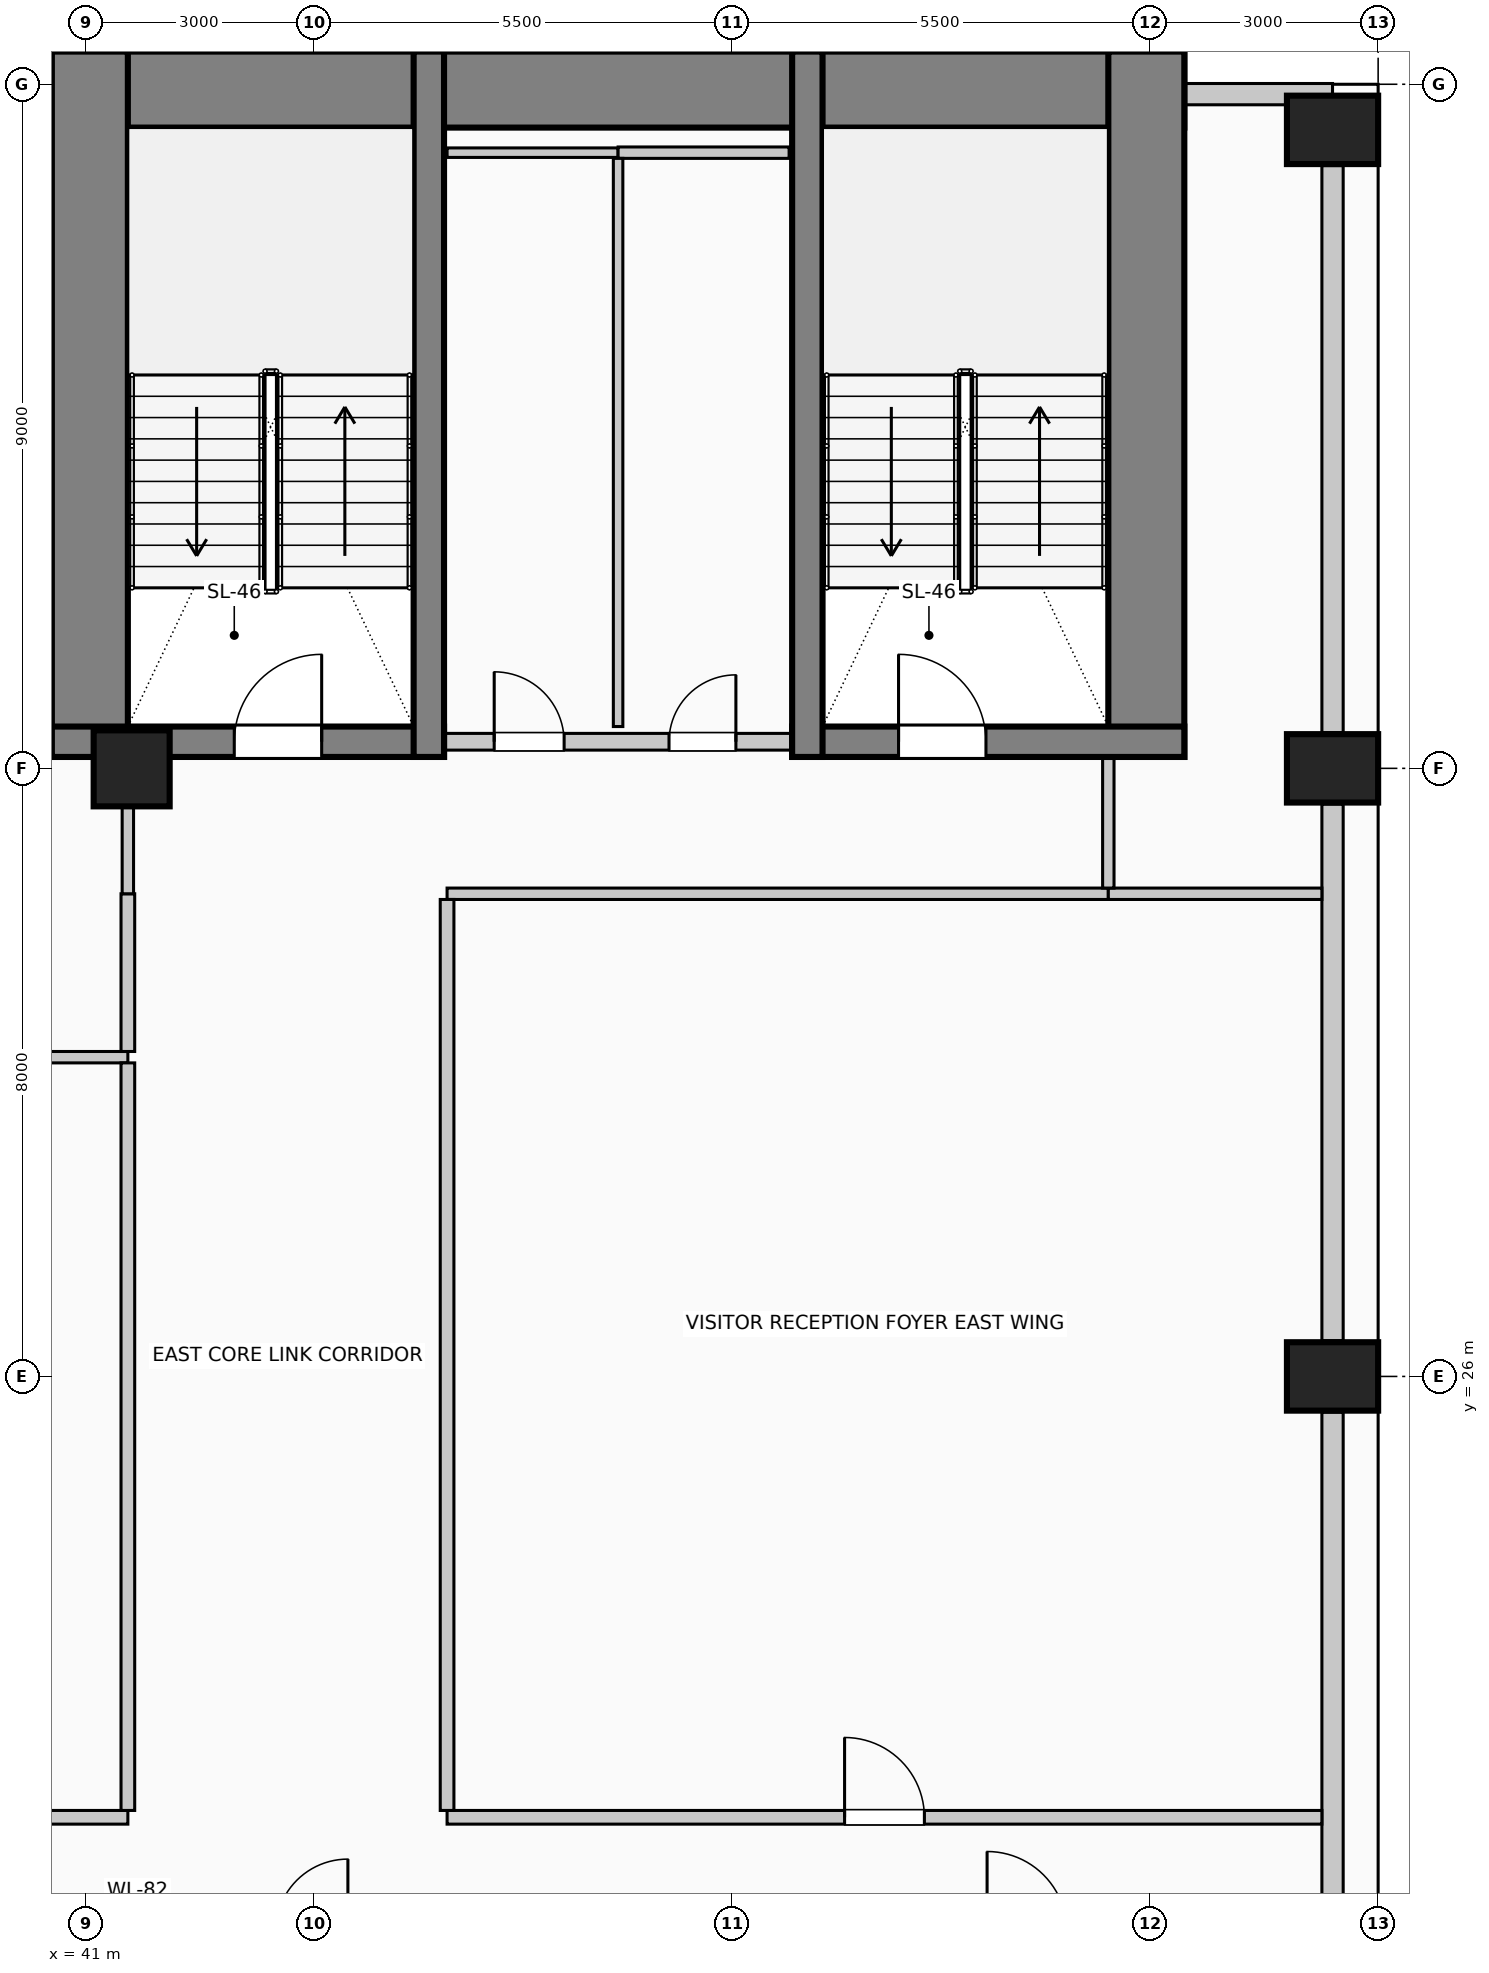
"""IFC4 building model, lengths in metres.
Left out: names, types, materials, properties, quantities, classifications, styles, units other than length and angle.
Written with IfcOpenShell. Run it as: python <this file> out.ifc"""

import sys

from ifc_helpers import new_model, si_unit, direction, frame, frame_2d, origin, origin_2d, place, context, subcontext, project, spatial, rectangle, circle, extrude, element, fill, save


model = new_model("IFC4")
c1 = context("Model", 3, precision=1e-05, world=origin(), true_north=direction((0.0, 1.0)))
c2 = subcontext(c1, "Body", "Model", "MODEL_VIEW")
j1 = project(units=[si_unit("LENGTHUNIT", "METRE"), si_unit("PLANEANGLEUNIT", "RADIAN")], contexts=[c1])
p1 = place(None, origin())
s1 = spatial("IfcSite", under=j1, at=p1, CompositionType="ELEMENT")
p2 = place(p1, origin())
s2 = spatial("IfcBuilding", under=s1, at=p2, CompositionType="ELEMENT")
p3 = place(p2, frame((0.0, 0.0, 66.6)))
s3 = spatial("IfcBuildingStorey", under=s2, at=p3, CompositionType="ELEMENT", Elevation=66.6)
p4 = place(p3, frame((40.55, 42.93, 0.0), z_axis=(0.0, 0.0, 1.0), x_axis=(1.0, 0.0, 0.0)))
e1 = element("IfcWall", 1, at=p4, inside=s3, PredefinedType="SHEAR", context=c2, shape_type="SweptSolid", body=[
    extrude(rectangle(XDim=14.9, YDim=1.0, at=frame_2d((7.45, 0.0))), origin(), (0.0, 0.0, 1.0), 4.0),
])
for number, where, z_axis, x_axis in (
    (2, (41.05, 34.15, 0.0), (0.0, 0.0, 1.0), (0.0, 1.0, 0.0)),
    (3, (54.95, 34.15, 0.0), (0.0, 0.0, 1.0), (0.0, 1.0, 0.0)),
):
    element("IfcWall", number, at=place(p3, frame(where, z_axis=z_axis, x_axis=x_axis)), inside=s3, PredefinedType="SHEAR", context=c2, shape_type="SweptSolid", body=[
        extrude(rectangle(XDim=9.28, YDim=1.0, at=frame_2d((4.64, 0.0))), origin(), (0.0, 0.0, 1.0), 4.0),
    ])
p5 = place(p3, frame((40.55, 34.35, 0.0), z_axis=(0.0, 0.0, 1.0), x_axis=(1.0, 0.0, 0.0)))
e4 = element("IfcWall", 4, at=p5, inside=s3, PredefinedType="SHEAR", context=c2, shape_type="SweptSolid", body=[
    extrude(rectangle(XDim=5.16, YDim=0.4, at=frame_2d((2.58, 0.0))), origin(), (0.0, 0.0, 1.0), 4.0),
])
p6 = place(p5, frame((2.4, 0.0, 0.0)))
e5 = element("IfcOpeningElement", 5, at=p6, cuts=e4, PredefinedType="OPENING", context=c2, shape_type="SweptSolid", body=[
    extrude(rectangle(XDim=1.15, YDim=2.2, at=frame_2d((0.575, 1.1))), frame((0.0, 0.21, 0.0), z_axis=(0.0, -1.0, 0.0), x_axis=(1.0, 0.0, 0.0)), (0.0, 0.0, 1.0), 0.42),
])
p7 = place(p3, frame((45.51, 34.15, 0.0), z_axis=(0.0, 0.0, 1.0), x_axis=(0.0, 1.0, 0.0)))
e6 = element("IfcWall", 6, at=p7, inside=s3, PredefinedType="SHEAR", context=c2, shape_type="SweptSolid", body=[
    extrude(rectangle(XDim=9.28, YDim=0.4, at=frame_2d((4.64, 0.0))), origin(), (0.0, 0.0, 1.0), 4.0),
])
p8 = place(p3, frame((50.29, 34.35, 0.0), z_axis=(0.0, 0.0, 1.0), x_axis=(1.0, 0.0, 0.0)))
e7 = element("IfcWall", 7, at=p8, inside=s3, PredefinedType="SHEAR", context=c2, shape_type="SweptSolid", body=[
    extrude(rectangle(XDim=5.16, YDim=0.4, at=frame_2d((2.58, 0.0))), origin(), (0.0, 0.0, 1.0), 4.0),
])
p9 = place(p8, frame((1.4, 0.0, 0.0)))
e8 = element("IfcOpeningElement", 8, at=p9, cuts=e7, PredefinedType="OPENING", context=c2, shape_type="SweptSolid", body=[
    extrude(rectangle(XDim=1.15, YDim=2.2, at=frame_2d((0.575, 1.1))), frame((0.0, 0.21, 0.0), z_axis=(0.0, -1.0, 0.0), x_axis=(1.0, 0.0, 0.0)), (0.0, 0.0, 1.0), 0.42),
])
p10 = place(p3, frame((50.49, 34.15, 0.0), z_axis=(0.0, 0.0, 1.0), x_axis=(0.0, 1.0, 0.0)))
e9 = element("IfcWall", 9, at=p10, inside=s3, PredefinedType="SHEAR", context=c2, shape_type="SweptSolid", body=[
    extrude(rectangle(XDim=9.28, YDim=0.4, at=frame_2d((4.64, 0.0))), origin(), (0.0, 0.0, 1.0), 4.0),
])
for number, where, z_axis, x_axis in (
    (10, (57.4, 26.0, 0.0), (0.0, 0.0, 1.0), (0.0, 1.0, 0.0)),
    (11, (57.4, 34.0, 0.0), (0.0, 0.0, 1.0), (0.0, 1.0, 0.0)),
    (12, (57.4, 42.4, 0.0), (0.0, 0.0, 1.0), (0.0, 1.0, 0.0)),
):
    element("IfcColumn", number, at=place(p3, frame(where, z_axis=z_axis, x_axis=x_axis)), inside=s3, PredefinedType="COLUMN", context=c2, shape_type="SweptSolid", body=[
        extrude(rectangle(XDim=0.9, YDim=1.2, at=origin_2d()), origin(), (0.0, 0.0, 1.0), 4.0),
    ])
p11 = place(p3, frame((41.6, 34.0, 0.0), z_axis=(0.0, 0.0, 1.0), x_axis=(1.0, 0.0, 0.0)))
e13 = element("IfcColumn", 13, at=p11, inside=s3, PredefinedType="COLUMN", context=c2, shape_type="SweptSolid", body=[
    extrude(circle(Radius=0.5, at=origin_2d()), origin(), (0.0, 0.0, 1.0), 4.0),
])
for number, where, z_axis, x_axis in (
    (14, (57.4, 25.53, 0.0), (0.0, 0.0, 1.0), (0.0, -1.0, 0.0)),
    (15, (57.4, 33.53, 0.0), (0.0, 0.0, 1.0), (0.0, -1.0, 0.0)),
):
    element("IfcWall", number, at=place(p3, frame(where, z_axis=z_axis, x_axis=x_axis)), inside=s3, PredefinedType="SOLIDWALL", context=c2, shape_type="SweptSolid", body=[
        extrude(rectangle(XDim=7.06, YDim=0.28, at=frame_2d((3.53, 0.0))), origin(), (0.0, 0.0, 1.0), 2.85),
    ])
p12 = place(p3, frame((57.4, 41.93, 0.0), z_axis=(0.0, 0.0, 1.0), x_axis=(0.0, -1.0, 0.0)))
e16 = element("IfcWall", 16, at=p12, inside=s3, PredefinedType="SOLIDWALL", context=c2, shape_type="SweptSolid", body=[
    extrude(rectangle(XDim=7.46, YDim=0.28, at=frame_2d((3.73, 0.0))), origin(), (0.0, 0.0, 1.0), 2.85),
])
p13 = place(p3, frame((55.455, 42.87, 0.0), z_axis=(0.0, 0.0, 1.0), x_axis=(1.0, 0.0, 0.0)))
e17 = element("IfcWall", 17, at=p13, inside=s3, PredefinedType="SOLIDWALL", context=c2, shape_type="SweptSolid", body=[
    extrude(rectangle(XDim=1.945, YDim=0.28, at=frame_2d((0.972, 0.0))), origin(), (0.0, 0.0, 1.0), 3.7),
])
p14 = place(p3, frame((45.72, 34.35, 0.0), z_axis=(0.0, 0.0, 1.0), x_axis=(1.0, 0.0, 0.0)))
e18 = element("IfcWall", 18, at=p14, inside=s3, PredefinedType="PARTITIONING", context=c2, shape_type="SweptSolid", body=[
    extrude(rectangle(XDim=4.56, YDim=0.22, at=frame_2d((2.28, 0.0))), origin(), (0.0, 0.0, 1.0), 3.7),
])
p15 = place(p14, frame((0.65, 0.0, 0.0)))
e19 = element("IfcOpeningElement", 19, at=p15, cuts=e18, PredefinedType="OPENING", context=c2, shape_type="SweptSolid", body=[
    extrude(rectangle(XDim=0.92, YDim=2.1, at=frame_2d((0.46, 1.05))), frame((0.0, 0.12, 0.0), z_axis=(0.0, -1.0, 0.0), x_axis=(1.0, 0.0, 0.0)), (0.0, 0.0, 1.0), 0.24),
])
p16 = place(p14, frame((2.95, 0.0, 0.0)))
e20 = element("IfcOpeningElement", 20, at=p16, cuts=e18, PredefinedType="OPENING", context=c2, shape_type="SweptSolid", body=[
    extrude(rectangle(XDim=0.88, YDim=2.1, at=frame_2d((0.44, 1.05))), frame((0.0, 0.12, 0.0), z_axis=(0.0, -1.0, 0.0), x_axis=(1.0, 0.0, 0.0)), (0.0, 0.0, 1.0), 0.24),
])
p17 = place(p3, frame((40.1, 20.2, 0.0), z_axis=(0.0, 0.0, 1.0), x_axis=(1.0, 0.0, 0.0)))
e21 = element("IfcWall", 21, at=p17, inside=s3, PredefinedType="PARTITIONING", context=c2, shape_type="SweptSolid", body=[
    extrude(rectangle(XDim=1.45, YDim=0.18, at=frame_2d((0.725, 0.0))), origin(), (0.0, 0.0, 1.0), 3.7),
])
p18 = place(p3, frame((45.75, 20.2, 0.0), z_axis=(0.0, 0.0, 1.0), x_axis=(1.0, 0.0, 0.0)))
e22 = element("IfcWall", 22, at=p18, inside=s3, PredefinedType="PARTITIONING", context=c2, shape_type="SweptSolid", body=[
    extrude(rectangle(XDim=11.51, YDim=0.18, at=frame_2d((5.755, 0.0))), origin(), (0.0, 0.0, 1.0), 3.7),
])
p19 = place(p18, frame((5.23, 0.0, 0.0)))
e23 = element("IfcOpeningElement", 23, at=p19, cuts=e22, PredefinedType="OPENING", context=c2, shape_type="SweptSolid", body=[
    extrude(rectangle(XDim=1.05, YDim=2.15, at=frame_2d((0.525, 1.075))), frame((0.0, 0.1, 0.0), z_axis=(0.0, -1.0, 0.0), x_axis=(1.0, 0.0, 0.0)), (0.0, 0.0, 1.0), 0.2),
])
p20 = place(p3, frame((40.1, 30.2, 0.0), z_axis=(0.0, 0.0, 1.0), x_axis=(1.0, 0.0, 0.0)))
e24 = element("IfcWall", 24, at=p20, inside=s3, PredefinedType="PARTITIONING", context=c2, shape_type="SweptSolid", body=[
    extrude(rectangle(XDim=1.45, YDim=0.15, at=frame_2d((0.725, 0.0))), origin(), (0.0, 0.0, 1.0), 3.7),
])
p21 = place(p3, frame((45.75, 32.35, 0.0), z_axis=(0.0, 0.0, 1.0), x_axis=(1.0, 0.0, 0.0)))
e25 = element("IfcWall", 25, at=p21, inside=s3, PredefinedType="PARTITIONING", context=c2, shape_type="SweptSolid", body=[
    extrude(rectangle(XDim=8.7, YDim=0.15, at=frame_2d((4.35, 0.0))), origin(), (0.0, 0.0, 1.0), 3.7),
])
p22 = place(p3, frame((54.45, 32.35, 0.0), z_axis=(0.0, 0.0, 1.0), x_axis=(1.0, 0.0, 0.0)))
e26 = element("IfcWall", 26, at=p22, inside=s3, PredefinedType="PARTITIONING", context=c2, shape_type="SweptSolid", body=[
    extrude(rectangle(XDim=2.81, YDim=0.15, at=frame_2d((1.405, 0.0))), origin(), (0.0, 0.0, 1.0), 3.7),
])
p23 = place(p3, frame((45.75, 42.1, 0.0), z_axis=(0.0, 0.0, 1.0), x_axis=(1.0, 0.0, 0.0)))
e27 = element("IfcWall", 27, at=p23, inside=s3, PredefinedType="PARTITIONING", context=c2, shape_type="SweptSolid", body=[
    extrude(rectangle(XDim=2.25, YDim=0.125, at=frame_2d((1.125, 0.0))), origin(), (0.0, 0.0, 1.0), 3.7),
])
p24 = place(p3, frame((48.0, 42.1, 0.0), z_axis=(0.0, 0.0, 1.0), x_axis=(1.0, 0.0, 0.0)))
e28 = element("IfcWall", 28, at=p24, inside=s3, PredefinedType="PARTITIONING", context=c2, shape_type="SweptSolid", body=[
    extrude(rectangle(XDim=2.25, YDim=0.15, at=frame_2d((1.125, 0.0))), origin(), (0.0, 0.0, 1.0), 3.7),
])
p25 = place(p3, frame((41.55, 20.29, 0.0), z_axis=(0.0, 0.0, 1.0), x_axis=(0.0, 1.0, 0.0)))
e29 = element("IfcWall", 29, at=p25, inside=s3, PredefinedType="PARTITIONING", context=c2, shape_type="SweptSolid", body=[
    extrude(rectangle(XDim=9.835, YDim=0.18, at=frame_2d((4.917, 0.0))), origin(), (0.0, 0.0, 1.0), 2.995),
])
p26 = place(p3, frame((41.55, 30.275, 0.0), z_axis=(0.0, 0.0, 1.0), x_axis=(0.0, 1.0, 0.0)))
e30 = element("IfcWall", 30, at=p26, inside=s3, PredefinedType="PARTITIONING", context=c2, shape_type="SweptSolid", body=[
    extrude(rectangle(XDim=2.075, YDim=0.18, at=frame_2d((1.038, 0.0))), origin(), (0.0, 0.0, 1.0), 2.995),
])
p27 = place(p3, frame((41.55, 32.35, 0.0), z_axis=(0.0, 0.0, 1.0), x_axis=(0.0, 1.0, 0.0)))
e31 = element("IfcWall", 31, at=p27, inside=s3, PredefinedType="PARTITIONING", context=c2, shape_type="SweptSolid", body=[
    extrude(rectangle(XDim=1.15, YDim=0.15, at=frame_2d((0.575, 0.0))), origin(), (0.0, 0.0, 1.0), 2.995),
])
p28 = place(p3, frame((41.55, 43.43, 0.0), z_axis=(0.0, 0.0, 1.0), x_axis=(0.0, 1.0, 0.0)))
e32 = element("IfcWall", 32, at=p28, inside=s3, PredefinedType="PARTITIONING", context=c2, shape_type="SweptSolid", body=[
    extrude(rectangle(XDim=1.22, YDim=0.15, at=frame_2d((0.61, 0.0))), origin(), (0.0, 0.0, 1.0), 3.7),
])
p29 = place(p3, frame((45.75, 20.29, 0.0), z_axis=(0.0, 0.0, 1.0), x_axis=(0.0, 1.0, 0.0)))
e33 = element("IfcWall", 33, at=p29, inside=s3, PredefinedType="PARTITIONING", context=c2, shape_type="SweptSolid", body=[
    extrude(rectangle(XDim=11.985, YDim=0.18, at=frame_2d((5.992, 0.0))), origin(), (0.0, 0.0, 1.0), 3.7),
])
p30 = place(p3, frame((48.0, 34.55, 0.0), z_axis=(0.0, 0.0, 1.0), x_axis=(0.0, 1.0, 0.0)))
e34 = element("IfcWall", 34, at=p30, inside=s3, PredefinedType="PARTITIONING", context=c2, shape_type="SweptSolid", body=[
    extrude(rectangle(XDim=7.475, YDim=0.125, at=frame_2d((3.737, 0.0))), origin(), (0.0, 0.0, 1.0), 3.7),
])
p31 = place(p3, frame((54.45, 32.425, 0.0), z_axis=(0.0, 0.0, 1.0), x_axis=(0.0, 1.0, 0.0)))
e35 = element("IfcWall", 35, at=p31, inside=s3, PredefinedType="PARTITIONING", context=c2, shape_type="SweptSolid", body=[
    extrude(rectangle(XDim=1.725, YDim=0.15, at=frame_2d((0.862, 0.0))), origin(), (0.0, 0.0, 1.0), 3.7),
])
p32 = place(p6, origin())
e36 = element("IfcDoor", 36, at=p32, inside=s3, OperationType="SINGLE_SWING_RIGHT", PredefinedType="DOOR", context=c2, shape_type="SweptSolid", body=[
    extrude(rectangle(XDim=1.15, YDim=2.2, at=frame_2d((0.575, 1.1))), frame((0.0, 0.025, 0.0), z_axis=(0.0, -1.0, 0.0), x_axis=(1.0, 0.0, 0.0)), (0.0, 0.0, 1.0), 0.05),
])
fill(e5, e36)
p33 = place(p15, origin())
e37 = element("IfcDoor", 37, at=p33, inside=s3, OperationType="SINGLE_SWING_LEFT", PredefinedType="DOOR", context=c2, shape_type="SweptSolid", body=[
    extrude(rectangle(XDim=0.92, YDim=2.1, at=frame_2d((0.46, 1.05))), frame((0.0, 0.025, 0.0), z_axis=(0.0, -1.0, 0.0), x_axis=(1.0, 0.0, 0.0)), (0.0, 0.0, 1.0), 0.05),
])
fill(e19, e37)
p34 = place(p16, origin())
e38 = element("IfcDoor", 38, at=p34, inside=s3, OperationType="SINGLE_SWING_RIGHT", PredefinedType="DOOR", context=c2, shape_type="SweptSolid", body=[
    extrude(rectangle(XDim=0.88, YDim=2.1, at=frame_2d((0.44, 1.05))), frame((0.0, 0.025, 0.0), z_axis=(0.0, -1.0, 0.0), x_axis=(1.0, 0.0, 0.0)), (0.0, 0.0, 1.0), 0.05),
])
fill(e20, e38)
p35 = place(p9, origin())
e39 = element("IfcDoor", 39, at=p35, inside=s3, OperationType="SINGLE_SWING_LEFT", PredefinedType="DOOR", context=c2, shape_type="SweptSolid", body=[
    extrude(rectangle(XDim=1.15, YDim=2.2, at=frame_2d((0.575, 1.1))), frame((0.0, 0.025, 0.0), z_axis=(0.0, -1.0, 0.0), x_axis=(1.0, 0.0, 0.0)), (0.0, 0.0, 1.0), 0.05),
])
fill(e8, e39)
p36 = place(p19, origin())
e40 = element("IfcDoor", 40, at=p36, inside=s3, OperationType="SINGLE_SWING_LEFT", PredefinedType="DOOR", context=c2, shape_type="SweptSolid", body=[
    extrude(rectangle(XDim=1.05, YDim=2.15, at=frame_2d((0.525, 1.075))), frame((0.0, 0.025, 0.0), z_axis=(0.0, -1.0, 0.0), x_axis=(1.0, 0.0, 0.0)), (0.0, 0.0, 1.0), 0.05),
])
fill(e23, e40)
save(model, sys.argv[1])
